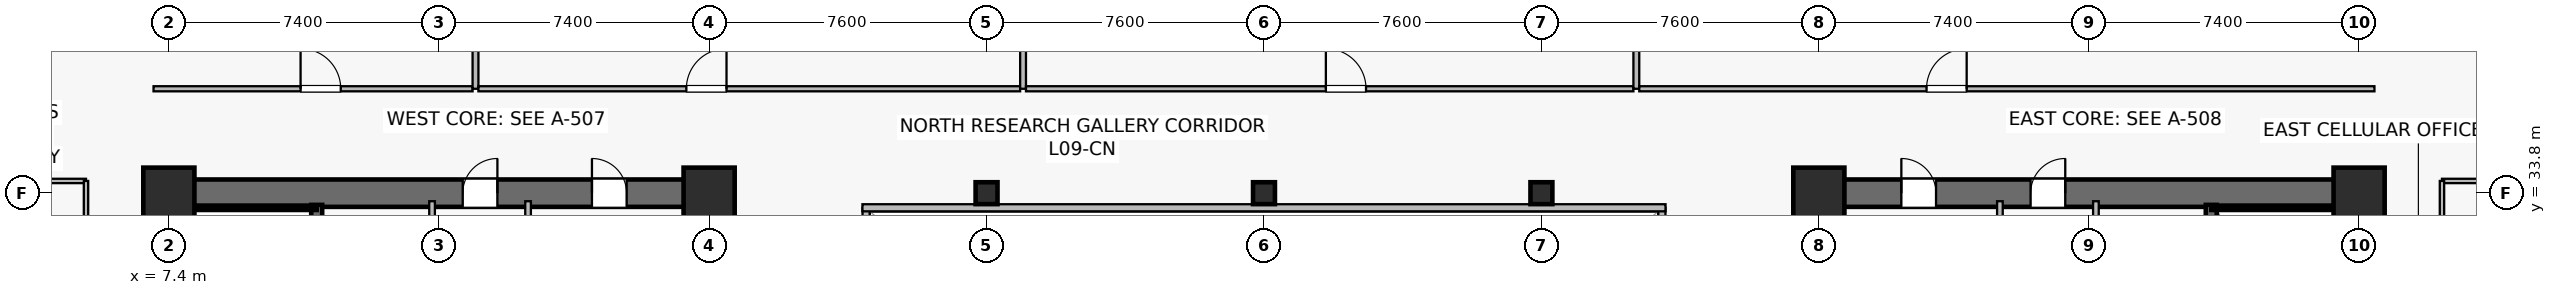
"""IFC4 building model, lengths in metres.
Left out: names, types, materials, properties, quantities, classifications, styles, units other than length and angle.
Written with IfcOpenShell. Run it as: python <this file> out.ifc"""

import sys

from ifc_helpers import new_model, si_unit, direction, frame, frame_2d, origin, origin_2d, place, context, subcontext, project, spatial, rectangle, hollow_rectangle, extrude, source, transform, mapped, element, fill, save


model = new_model("IFC4")
c1 = context("Model", 3, precision=1e-05, world=origin(), true_north=direction((0.0, 1.0)))
c2 = subcontext(c1, "Body", "Model", "MODEL_VIEW")
j1 = project(units=[si_unit("LENGTHUNIT", "METRE"), si_unit("PLANEANGLEUNIT", "RADIAN")], contexts=[c1])
p1 = place(None, origin())
s1 = spatial("IfcSite", under=j1, at=p1, CompositionType="ELEMENT")
p2 = place(p1, origin())
s2 = spatial("IfcBuilding", under=s1, at=p2, CompositionType="ELEMENT")
p3 = place(p2, frame((0.0, 0.0, 37.5)))
s3 = spatial("IfcBuildingStorey", under=s2, at=p3, CompositionType="ELEMENT", Elevation=37.5)
p4 = place(p3, frame((7.025, 33.8, 0.0), z_axis=(0.0, 0.0, 1.0), x_axis=(1.0, 0.0, 0.0)))
e1 = element("IfcWall", 1, at=p4, inside=s3, PredefinedType="SHEAR", context=c2, shape_type="SweptSolid", body=[
    extrude(rectangle(XDim=15.55, YDim=0.75, at=frame_2d((7.775, 0.0))), origin(), (0.0, 0.0, 1.0), 3.78),
])
p5 = place(p4, frame((8.425, 0.0, 0.0)))
e2 = element("IfcOpeningElement", 2, at=p5, cuts=e1, PredefinedType="OPENING", context=c2, shape_type="SweptSolid", body=[
    extrude(rectangle(XDim=0.95, YDim=2.15, at=frame_2d((0.475, 1.075))), frame((0.0, 0.385, 0.0), z_axis=(0.0, -1.0, 0.0), x_axis=(1.0, 0.0, 0.0)), (0.0, 0.0, 1.0), 0.77),
])
p6 = place(p4, frame((11.965, 0.0, 0.0)))
e3 = element("IfcOpeningElement", 3, at=p6, cuts=e1, PredefinedType="OPENING", context=c2, shape_type="SweptSolid", body=[
    extrude(rectangle(XDim=0.95, YDim=2.15, at=frame_2d((0.475, 1.075))), frame((0.0, 0.385, 0.0), z_axis=(0.0, -1.0, 0.0), x_axis=(1.0, 0.0, 0.0)), (0.0, 0.0, 1.0), 0.77),
])
p7 = place(p3, frame((7.4, 15.175, 0.0), z_axis=(0.0, 0.0, 1.0), x_axis=(0.0, 1.0, 0.0)))
e4 = element("IfcWall", 4, at=p7, inside=s3, PredefinedType="SHEAR", context=c2, shape_type="SweptSolid", body=[
    extrude(rectangle(XDim=18.25, YDim=0.75, at=frame_2d((9.125, 0.0))), origin(), (0.0, 0.0, 1.0), 3.78),
])
p8 = place(p3, frame((22.2, 15.175, 0.0), z_axis=(0.0, 0.0, 1.0), x_axis=(0.0, 1.0, 0.0)))
e5 = element("IfcWall", 5, at=p8, inside=s3, PredefinedType="SHEAR", context=c2, shape_type="SweptSolid", body=[
    extrude(rectangle(XDim=18.25, YDim=0.75, at=frame_2d((9.125, 0.0))), origin(), (0.0, 0.0, 1.0), 3.78),
])
p9 = place(p8, frame((3.375, 0.0, 0.0)))
e6 = element("IfcOpeningElement", 6, at=p9, cuts=e5, PredefinedType="OPENING", context=c2, shape_type="SweptSolid", body=[
    extrude(rectangle(XDim=1.42, YDim=2.2, at=frame_2d((0.71, 1.1))), frame((0.0, 0.385, 0.0), z_axis=(0.0, -1.0, 0.0), x_axis=(1.0, 0.0, 0.0)), (0.0, 0.0, 1.0), 0.77),
])
p10 = place(p3, frame((11.45, 24.85, 0.0), z_axis=(0.0, 0.0, 1.0), x_axis=(0.0, 1.0, 0.0)))
e7 = element("IfcWall", 7, at=p10, inside=s3, PredefinedType="SHEAR", context=c2, shape_type="SweptSolid", body=[
    extrude(rectangle(XDim=8.63, YDim=0.3, at=frame_2d((4.315, 0.0))), origin(), (0.0, 0.0, 1.0), 3.78),
])
p11 = place(p10, frame((0.42, 0.0, 0.0)))
e8 = element("IfcOpeningElement", 8, at=p11, cuts=e7, PredefinedType="OPENING", context=c2, shape_type="SweptSolid", body=[
    extrude(rectangle(XDim=1.1, YDim=2.15, at=frame_2d((0.55, 1.075))), frame((0.0, 0.16, 0.0), z_axis=(0.0, -1.0, 0.0), x_axis=(1.0, 0.0, 0.0)), (0.0, 0.0, 1.0), 0.32),
])
p12 = place(p3, frame((7.73, 33.4, 0.0), z_axis=(0.0, 0.0, 1.0), x_axis=(1.0, 0.0, 0.0)))
e9 = element("IfcWall", 9, at=p12, inside=s3, PredefinedType="SOLIDWALL", context=c2, shape_type="SweptSolid", body=[
    extrude(rectangle(XDim=3.72, YDim=0.12, at=frame_2d((1.86, 0.0))), origin(), (0.0, 0.0, 1.0), 3.78),
])
p13 = place(p3, frame((52.225, 33.8, 0.0), z_axis=(0.0, 0.0, 1.0), x_axis=(1.0, 0.0, 0.0)))
e10 = element("IfcWall", 10, at=p13, inside=s3, PredefinedType="SHEAR", context=c2, shape_type="SweptSolid", body=[
    extrude(rectangle(XDim=15.55, YDim=0.75, at=frame_2d((7.775, 0.0))), origin(), (0.0, 0.0, 1.0), 3.78),
])
p14 = place(p13, frame((6.175, 0.0, 0.0)))
e11 = element("IfcOpeningElement", 11, at=p14, cuts=e10, PredefinedType="OPENING", context=c2, shape_type="SweptSolid", body=[
    extrude(rectangle(XDim=0.95, YDim=2.15, at=frame_2d((0.475, 1.075))), frame((0.0, 0.385, 0.0), z_axis=(0.0, -1.0, 0.0), x_axis=(1.0, 0.0, 0.0)), (0.0, 0.0, 1.0), 0.77),
])
p15 = place(p13, frame((2.635, 0.0, 0.0)))
e12 = element("IfcOpeningElement", 12, at=p15, cuts=e10, PredefinedType="OPENING", context=c2, shape_type="SweptSolid", body=[
    extrude(rectangle(XDim=0.95, YDim=2.15, at=frame_2d((0.475, 1.075))), frame((0.0, 0.385, 0.0), z_axis=(0.0, -1.0, 0.0), x_axis=(1.0, 0.0, 0.0)), (0.0, 0.0, 1.0), 0.77),
])
p16 = place(p3, frame((52.6, 15.175, 0.0), z_axis=(0.0, 0.0, 1.0), x_axis=(0.0, 1.0, 0.0)))
e13 = element("IfcWall", 13, at=p16, inside=s3, PredefinedType="SHEAR", context=c2, shape_type="SweptSolid", body=[
    extrude(rectangle(XDim=18.25, YDim=0.75, at=frame_2d((9.125, 0.0))), origin(), (0.0, 0.0, 1.0), 3.78),
])
p17 = place(p16, frame((3.375, 0.0, 0.0)))
e14 = element("IfcOpeningElement", 14, at=p17, cuts=e13, PredefinedType="OPENING", context=c2, shape_type="SweptSolid", body=[
    extrude(rectangle(XDim=1.42, YDim=2.2, at=frame_2d((0.71, 1.1))), frame((0.0, 0.385, 0.0), z_axis=(0.0, -1.0, 0.0), x_axis=(1.0, 0.0, 0.0)), (0.0, 0.0, 1.0), 0.77),
])
p18 = place(p3, frame((67.4, 15.175, 0.0), z_axis=(0.0, 0.0, 1.0), x_axis=(0.0, 1.0, 0.0)))
e15 = element("IfcWall", 15, at=p18, inside=s3, PredefinedType="SHEAR", context=c2, shape_type="SweptSolid", body=[
    extrude(rectangle(XDim=18.25, YDim=0.75, at=frame_2d((9.125, 0.0))), origin(), (0.0, 0.0, 1.0), 3.78),
])
p19 = place(p3, frame((63.35, 24.85, 0.0), z_axis=(0.0, 0.0, 1.0), x_axis=(0.0, 1.0, 0.0)))
e16 = element("IfcWall", 16, at=p19, inside=s3, PredefinedType="SHEAR", context=c2, shape_type="SweptSolid", body=[
    extrude(rectangle(XDim=8.63, YDim=0.3, at=frame_2d((4.315, 0.0))), origin(), (0.0, 0.0, 1.0), 3.78),
])
p20 = place(p19, frame((0.42, 0.0, 0.0)))
e17 = element("IfcOpeningElement", 17, at=p20, cuts=e16, PredefinedType="OPENING", context=c2, shape_type="SweptSolid", body=[
    extrude(rectangle(XDim=1.1, YDim=2.15, at=frame_2d((0.55, 1.075))), frame((0.0, 0.16, 0.0), z_axis=(0.0, -1.0, 0.0), x_axis=(1.0, 0.0, 0.0)), (0.0, 0.0, 1.0), 0.32),
])
p21 = place(p3, frame((63.35, 33.4, 0.0), z_axis=(0.0, 0.0, 1.0), x_axis=(1.0, 0.0, 0.0)))
e18 = element("IfcWall", 18, at=p21, inside=s3, PredefinedType="SOLIDWALL", context=c2, shape_type="SweptSolid", body=[
    extrude(rectangle(XDim=3.72, YDim=0.12, at=frame_2d((1.86, 0.0))), origin(), (0.0, 0.0, 1.0), 3.78),
])
m1 = source(origin(), c2, "Body", "SweptSolid", [
    extrude(rectangle(XDim=1.4, YDim=1.4, at=origin_2d()), origin(), (0.0, 0.0, 1.0), 4.1),
])
for number, where, z_axis, x_axis in (
    (19, (7.4, 33.8, 0.0), (0.0, 0.0, 1.0), (1.0, 0.0, 0.0)),
    (20, (22.2, 33.8, 0.0), (0.0, 0.0, 1.0), (1.0, 0.0, 0.0)),
    (21, (52.6, 33.8, 0.0), (0.0, 0.0, 1.0), (1.0, 0.0, 0.0)),
    (22, (67.4, 33.8, 0.0), (0.0, 0.0, 1.0), (1.0, 0.0, 0.0)),
):
    element("IfcColumn", number, at=place(p3, frame(where, z_axis=z_axis, x_axis=x_axis)), inside=s3, PredefinedType="COLUMN", context=c2, shape_type="MappedRepresentation", body=[
        mapped(m1, transform((0.0, 0.0, 0.0), scale=1.0)),
    ])
m2 = source(origin(), c2, "Body", "SweptSolid", [
    extrude(hollow_rectangle(XDim=0.6, YDim=0.6, WallThickness=0.028, at=origin_2d()), origin(), (0.0, 0.0, 1.0), 4.1),
])
for number, where, z_axis, x_axis in (
    (23, (29.8, 33.8, 0.0), (0.0, 0.0, 1.0), (1.0, 0.0, 0.0)),
    (24, (37.4, 33.8, 0.0), (0.0, 0.0, 1.0), (1.0, 0.0, 0.0)),
    (25, (45.0, 33.8, 0.0), (0.0, 0.0, 1.0), (1.0, 0.0, 0.0)),
):
    element("IfcColumn", number, at=place(p3, frame(where, z_axis=z_axis, x_axis=x_axis)), inside=s3, PredefinedType="COLUMN", context=c2, shape_type="MappedRepresentation", body=[
        mapped(m2, transform((0.0, 0.0, 0.0), scale=1.0)),
    ])
p22 = place(p3, frame((14.61, 29.65, 0.0), z_axis=(0.0, 0.0, 1.0), x_axis=(0.0, 1.0, 0.0)))
e26 = element("IfcWall", 26, at=p22, inside=s3, PredefinedType="PLUMBINGWALL", context=c2, shape_type="SweptSolid", body=[
    extrude(rectangle(XDim=3.93, YDim=0.155, at=frame_2d((1.965, 0.0))), origin(), (0.0, 0.0, 1.0), 3.065),
])
p23 = place(p3, frame((17.24, 29.65, 0.0), z_axis=(0.0, 0.0, 1.0), x_axis=(0.0, 1.0, 0.0)))
e27 = element("IfcWall", 27, at=p23, inside=s3, PredefinedType="PLUMBINGWALL", context=c2, shape_type="SweptSolid", body=[
    extrude(rectangle(XDim=3.93, YDim=0.155, at=frame_2d((1.965, 0.0))), origin(), (0.0, 0.0, 1.0), 3.78),
])
p24 = place(p3, frame((60.19, 29.65, 0.0), z_axis=(0.0, 0.0, 1.0), x_axis=(0.0, 1.0, 0.0)))
e28 = element("IfcWall", 28, at=p24, inside=s3, PredefinedType="PLUMBINGWALL", context=c2, shape_type="SweptSolid", body=[
    extrude(rectangle(XDim=3.93, YDim=0.155, at=frame_2d((1.965, 0.0))), origin(), (0.0, 0.0, 1.0), 3.065),
])
p25 = place(p3, frame((57.56, 29.65, 0.0), z_axis=(0.0, 0.0, 1.0), x_axis=(0.0, 1.0, 0.0)))
e29 = element("IfcWall", 29, at=p25, inside=s3, PredefinedType="PLUMBINGWALL", context=c2, shape_type="SweptSolid", body=[
    extrude(rectangle(XDim=3.93, YDim=0.155, at=frame_2d((1.965, 0.0))), origin(), (0.0, 0.0, 1.0), 3.78),
])
p26 = place(p3, frame((26.5, 15.2, 0.0), z_axis=(0.0, 0.0, 1.0), x_axis=(0.0, 1.0, 0.0)))
e30 = element("IfcWall", 30, at=p26, inside=s3, PredefinedType="SOLIDWALL", context=c2, shape_type="SweptSolid", body=[
    extrude(rectangle(XDim=18.2, YDim=0.195, at=frame_2d((9.1, 0.0))), origin(), (0.0, 0.0, 1.0), 3.78),
])
p27 = place(p26, frame((1.8, 0.0, 0.9)))
e31 = element("IfcOpeningElement", 31, at=p27, cuts=e30, PredefinedType="OPENING", context=c2, shape_type="SweptSolid", body=[
    extrude(rectangle(XDim=1.2, YDim=1.35, at=frame_2d((0.6, 0.675))), frame((0.0, 0.107, 0.0), z_axis=(0.0, -1.0, 0.0), x_axis=(1.0, 0.0, 0.0)), (0.0, 0.0, 1.0), 0.215),
])
p28 = place(p26, frame((13.2, 0.0, 0.9)))
e32 = element("IfcOpeningElement", 32, at=p28, cuts=e30, PredefinedType="OPENING", context=c2, shape_type="SweptSolid", body=[
    extrude(rectangle(XDim=1.2, YDim=1.35, at=frame_2d((0.6, 0.675))), frame((0.0, 0.107, 0.0), z_axis=(0.0, -1.0, 0.0), x_axis=(1.0, 0.0, 0.0)), (0.0, 0.0, 1.0), 0.215),
])
p29 = place(p3, frame((48.3, 15.2, 0.0), z_axis=(0.0, 0.0, 1.0), x_axis=(0.0, 1.0, 0.0)))
e33 = element("IfcWall", 33, at=p29, inside=s3, PredefinedType="SOLIDWALL", context=c2, shape_type="SweptSolid", body=[
    extrude(rectangle(XDim=18.2, YDim=0.195, at=frame_2d((9.1, 0.0))), origin(), (0.0, 0.0, 1.0), 3.78),
])
p30 = place(p29, frame((1.8, 0.0, 0.9)))
e34 = element("IfcOpeningElement", 34, at=p30, cuts=e33, PredefinedType="OPENING", context=c2, shape_type="SweptSolid", body=[
    extrude(rectangle(XDim=1.2, YDim=1.35, at=frame_2d((0.6, 0.675))), frame((0.0, 0.107, 0.0), z_axis=(0.0, -1.0, 0.0), x_axis=(1.0, 0.0, 0.0)), (0.0, 0.0, 1.0), 0.215),
])
p31 = place(p29, frame((13.2, 0.0, 0.9)))
e35 = element("IfcOpeningElement", 35, at=p31, cuts=e33, PredefinedType="OPENING", context=c2, shape_type="SweptSolid", body=[
    extrude(rectangle(XDim=1.2, YDim=1.35, at=frame_2d((0.6, 0.675))), frame((0.0, 0.107, 0.0), z_axis=(0.0, -1.0, 0.0), x_axis=(1.0, 0.0, 0.0)), (0.0, 0.0, 1.0), 0.215),
])
p32 = place(p3, frame((26.4, 33.4, 0.0), z_axis=(0.0, 0.0, 1.0), x_axis=(1.0, 0.0, 0.0)))
e36 = element("IfcWall", 36, at=p32, inside=s3, PredefinedType="SOLIDWALL", context=c2, shape_type="SweptSolid", body=[
    extrude(rectangle(XDim=22.0, YDim=0.195, at=frame_2d((11.0, 0.0))), origin(), (0.0, 0.0, 1.0), 3.78),
])
p33 = place(p3, frame((6.98, 36.66, 0.0), z_axis=(0.0, 0.0, 1.0), x_axis=(1.0, 0.0, 0.0)))
e37 = element("IfcWall", 37, at=p33, inside=s3, PredefinedType="PARTITIONING", context=c2, shape_type="SweptSolid", body=[
    extrude(rectangle(XDim=8.74, YDim=0.14, at=frame_2d((4.37, 0.0))), origin(), (0.0, 0.0, 1.0), 3.065),
])
p34 = place(p33, frame((4.028, 0.0, 0.0)))
e38 = element("IfcOpeningElement", 38, at=p34, cuts=e37, PredefinedType="OPENING", context=c2, shape_type="SweptSolid", body=[
    extrude(rectangle(XDim=1.1, YDim=2.18, at=frame_2d((0.55, 1.09))), frame((0.0, 0.08, 0.0), z_axis=(0.0, -1.0, 0.0), x_axis=(1.0, 0.0, 0.0)), (0.0, 0.0, 1.0), 0.16),
])
p35 = place(p3, frame((15.8, 36.66, 0.0), z_axis=(0.0, 0.0, 1.0), x_axis=(0.0, 1.0, 0.0)))
e39 = element("IfcWall", 39, at=p35, inside=s3, PredefinedType="PARTITIONING", context=c2, shape_type="SweptSolid", body=[
    extrude(rectangle(XDim=11.83, YDim=0.16, at=frame_2d((5.915, 0.0))), origin(), (0.0, 0.0, 1.0), 3.015),
])
p36 = place(p3, frame((15.88, 36.66, 0.0), z_axis=(0.0, 0.0, 1.0), x_axis=(1.0, 0.0, 0.0)))
e40 = element("IfcWall", 40, at=p36, inside=s3, PredefinedType="PARTITIONING", context=c2, shape_type="SweptSolid", body=[
    extrude(rectangle(XDim=14.84, YDim=0.14, at=frame_2d((7.42, 0.0))), origin(), (0.0, 0.0, 1.0), 3.065),
])
p37 = place(p36, frame((5.696, 0.0, 0.0)))
e41 = element("IfcOpeningElement", 41, at=p37, cuts=e40, PredefinedType="OPENING", context=c2, shape_type="SweptSolid", body=[
    extrude(rectangle(XDim=1.1, YDim=2.18, at=frame_2d((0.55, 1.09))), frame((0.0, 0.08, 0.0), z_axis=(0.0, -1.0, 0.0), x_axis=(1.0, 0.0, 0.0)), (0.0, 0.0, 1.0), 0.16),
])
p38 = place(p3, frame((30.8, 36.66, 0.0), z_axis=(0.0, 0.0, 1.0), x_axis=(0.0, 1.0, 0.0)))
e42 = element("IfcWall", 42, at=p38, inside=s3, PredefinedType="PARTITIONING", context=c2, shape_type="SweptSolid", body=[
    extrude(rectangle(XDim=10.63, YDim=0.16, at=frame_2d((5.315, 0.0))), origin(), (0.0, 0.0, 1.0), 3.015),
])
p39 = place(p3, frame((30.88, 36.66, 0.0), z_axis=(0.0, 0.0, 1.0), x_axis=(1.0, 0.0, 0.0)))
e43 = element("IfcWall", 43, at=p39, inside=s3, PredefinedType="PARTITIONING", context=c2, shape_type="SweptSolid", body=[
    extrude(rectangle(XDim=16.64, YDim=0.14, at=frame_2d((8.32, 0.0))), origin(), (0.0, 0.0, 1.0), 3.065),
])
p40 = place(p39, frame((8.215, 0.0, 0.0)))
e44 = element("IfcOpeningElement", 44, at=p40, cuts=e43, PredefinedType="OPENING", context=c2, shape_type="SweptSolid", body=[
    extrude(rectangle(XDim=1.1, YDim=2.18, at=frame_2d((0.55, 1.09))), frame((0.0, 0.08, 0.0), z_axis=(0.0, -1.0, 0.0), x_axis=(1.0, 0.0, 0.0)), (0.0, 0.0, 1.0), 0.16),
])
p41 = place(p3, frame((47.6, 36.66, 0.0), z_axis=(0.0, 0.0, 1.0), x_axis=(0.0, 1.0, 0.0)))
e45 = element("IfcWall", 45, at=p41, inside=s3, PredefinedType="PARTITIONING", context=c2, shape_type="SweptSolid", body=[
    extrude(rectangle(XDim=10.63, YDim=0.16, at=frame_2d((5.315, 0.0))), origin(), (0.0, 0.0, 1.0), 3.015),
])
p42 = place(p3, frame((47.68, 36.66, 0.0), z_axis=(0.0, 0.0, 1.0), x_axis=(1.0, 0.0, 0.0)))
e46 = element("IfcWall", 46, at=p42, inside=s3, PredefinedType="PARTITIONING", context=c2, shape_type="SweptSolid", body=[
    extrude(rectangle(XDim=20.14, YDim=0.14, at=frame_2d((10.07, 0.0))), origin(), (0.0, 0.0, 1.0), 3.065),
])
p43 = place(p42, frame((7.869, 0.0, 0.0)))
e47 = element("IfcOpeningElement", 47, at=p43, cuts=e46, PredefinedType="OPENING", context=c2, shape_type="SweptSolid", body=[
    extrude(rectangle(XDim=1.1, YDim=2.18, at=frame_2d((0.55, 1.09))), frame((0.0, 0.08, 0.0), z_axis=(0.0, -1.0, 0.0), x_axis=(1.0, 0.0, 0.0)), (0.0, 0.0, 1.0), 0.16),
])
p44 = place(p3, frame((0.11, 34.135, 0.0), z_axis=(0.0, 0.0, 1.0), x_axis=(1.0, 0.0, 0.0)))
e48 = element("IfcWall", 48, at=p44, inside=s3, PredefinedType="PARTITIONING", context=c2, shape_type="SweptSolid", body=[
    extrude(rectangle(XDim=5.02, YDim=0.12, at=frame_2d((2.51, 0.0))), origin(), (0.0, 0.0, 1.0), 3.78),
])
p45 = place(p3, frame((5.13, 27.66, 0.0), z_axis=(0.0, 0.0, 1.0), x_axis=(0.0, 1.0, 0.0)))
e49 = element("IfcWall", 49, at=p45, inside=s3, PredefinedType="PARTITIONING", context=c2, shape_type="SweptSolid", body=[
    extrude(rectangle(XDim=6.475, YDim=0.12, at=frame_2d((3.238, 0.0))), origin(), (0.0, 0.0, 1.0), 3.78),
])
p46 = place(p45, frame((2.788, 0.0, 0.0)))
e50 = element("IfcOpeningElement", 50, at=p46, cuts=e49, PredefinedType="OPENING", context=c2, shape_type="SweptSolid", body=[
    extrude(rectangle(XDim=0.9, YDim=2.1, at=frame_2d((0.45, 1.05))), frame((0.0, 0.07, 0.0), z_axis=(0.0, -1.0, 0.0), x_axis=(1.0, 0.0, 0.0)), (0.0, 0.0, 1.0), 0.14),
])
p47 = place(p3, frame((69.67, 34.135, 0.0), z_axis=(0.0, 0.0, 1.0), x_axis=(1.0, 0.0, 0.0)))
e51 = element("IfcWall", 51, at=p47, inside=s3, PredefinedType="PARTITIONING", context=c2, shape_type="SweptSolid", body=[
    extrude(rectangle(XDim=5.02, YDim=0.12, at=frame_2d((2.51, 0.0))), origin(), (0.0, 0.0, 1.0), 3.78),
])
p48 = place(p3, frame((69.67, 23.26, 0.0), z_axis=(0.0, 0.0, 1.0), x_axis=(0.0, 1.0, 0.0)))
e52 = element("IfcWall", 52, at=p48, inside=s3, PredefinedType="PARTITIONING", context=c2, shape_type="SweptSolid", body=[
    extrude(rectangle(XDim=10.875, YDim=0.12, at=frame_2d((5.438, 0.0))), origin(), (0.0, 0.0, 1.0), 3.78),
])
p49 = place(p48, frame((4.988, 0.0, 0.0)))
e53 = element("IfcOpeningElement", 53, at=p49, cuts=e52, PredefinedType="OPENING", context=c2, shape_type="SweptSolid", body=[
    extrude(rectangle(XDim=0.9, YDim=2.1, at=frame_2d((0.45, 1.05))), frame((0.0, 0.07, 0.0), z_axis=(0.0, -1.0, 0.0), x_axis=(1.0, 0.0, 0.0)), (0.0, 0.0, 1.0), 0.14),
])
m3 = source(origin(), c2, "Body", "SweptSolid", [
    extrude(rectangle(XDim=0.95, YDim=2.15, at=frame_2d((0.475, 1.075))), frame((0.0, 0.025, 0.0), z_axis=(0.0, -1.0, 0.0), x_axis=(1.0, 0.0, 0.0)), (0.0, 0.0, 1.0), 0.05),
])
p50 = place(p5, origin())
e54 = element("IfcDoor", 54, at=p50, inside=s3, OperationType="SINGLE_SWING_RIGHT", PredefinedType="DOOR", context=c2, shape_type="MappedRepresentation", body=[
    mapped(m3, transform((0.0, 0.0, 0.0), scale=1.0)),
])
fill(e2, e54)
p51 = place(p6, origin())
e55 = element("IfcDoor", 55, at=p51, inside=s3, OperationType="SINGLE_SWING_LEFT", PredefinedType="DOOR", context=c2, shape_type="MappedRepresentation", body=[
    mapped(m3, transform((0.0, 0.0, 0.0), scale=1.0)),
])
fill(e3, e55)
p52 = place(p14, origin())
e56 = element("IfcDoor", 56, at=p52, inside=s3, OperationType="SINGLE_SWING_RIGHT", PredefinedType="DOOR", context=c2, shape_type="MappedRepresentation", body=[
    mapped(m3, transform((0.0, 0.0, 0.0), scale=1.0)),
])
fill(e11, e56)
p53 = place(p15, origin())
e57 = element("IfcDoor", 57, at=p53, inside=s3, OperationType="SINGLE_SWING_LEFT", PredefinedType="DOOR", context=c2, shape_type="MappedRepresentation", body=[
    mapped(m3, transform((0.0, 0.0, 0.0), scale=1.0)),
])
fill(e12, e57)
m4 = source(origin(), c2, "Body", "SweptSolid", [
    extrude(rectangle(XDim=1.1, YDim=2.18, at=frame_2d((0.55, 1.09))), frame((0.0, 0.025, 0.0), z_axis=(0.0, -1.0, 0.0), x_axis=(1.0, 0.0, 0.0)), (0.0, 0.0, 1.0), 0.05),
])
p54 = place(p34, origin())
e58 = element("IfcDoor", 58, at=p54, inside=s3, OperationType="SINGLE_SWING_LEFT", PredefinedType="DOOR", context=c2, shape_type="MappedRepresentation", body=[
    mapped(m4, transform((0.0, 0.0, 0.0), scale=1.0)),
])
fill(e38, e58)
p55 = place(p37, origin())
e59 = element("IfcDoor", 59, at=p55, inside=s3, OperationType="SINGLE_SWING_RIGHT", PredefinedType="DOOR", context=c2, shape_type="MappedRepresentation", body=[
    mapped(m4, transform((0.0, 0.0, 0.0), scale=1.0)),
])
fill(e41, e59)
p56 = place(p40, origin())
e60 = element("IfcDoor", 60, at=p56, inside=s3, OperationType="SINGLE_SWING_LEFT", PredefinedType="DOOR", context=c2, shape_type="MappedRepresentation", body=[
    mapped(m4, transform((0.0, 0.0, 0.0), scale=1.0)),
])
fill(e44, e60)
p57 = place(p43, origin())
e61 = element("IfcDoor", 61, at=p57, inside=s3, OperationType="SINGLE_SWING_RIGHT", PredefinedType="DOOR", context=c2, shape_type="MappedRepresentation", body=[
    mapped(m4, transform((0.0, 0.0, 0.0), scale=1.0)),
])
fill(e47, e61)
save(model, sys.argv[1])
